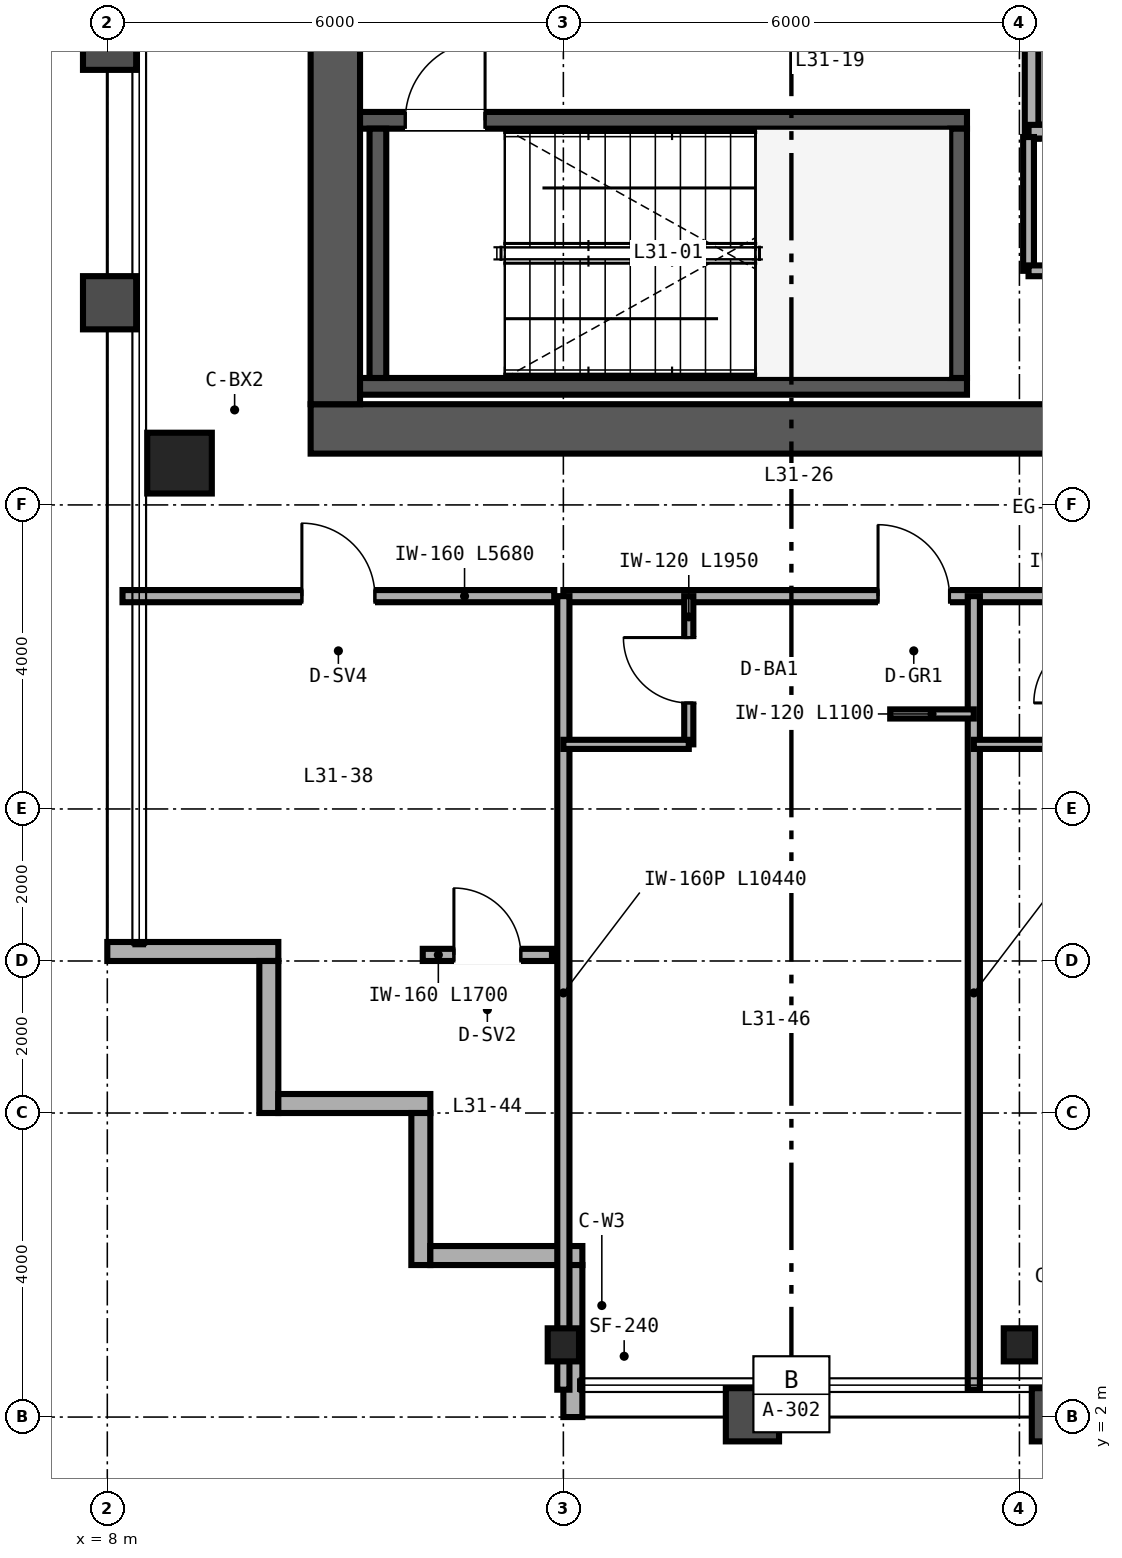
"""IFC4 building model, lengths in metres.
Left out: names, types, materials, properties, quantities, classifications, styles, units other than length and angle.
Written with IfcOpenShell. Run it as: python <this file> out.ifc"""

import sys

from ifc_helpers import new_model, si_unit, direction, frame, frame_2d, origin, origin_2d, place, context, subcontext, project, spatial, rectangle, hollow_rectangle, i_section, extrude, source, transform, mapped, element, fill, save


model = new_model("IFC4")
c1 = context("Model", 3, precision=1e-05, world=origin(), true_north=direction((0.0, 1.0)))
c2 = subcontext(c1, "Body", "Model", "MODEL_VIEW")
j1 = project(units=[si_unit("LENGTHUNIT", "METRE"), si_unit("PLANEANGLEUNIT", "RADIAN")], contexts=[c1])
p1 = place(None, origin())
s1 = spatial("IfcSite", under=j1, at=p1, CompositionType="ELEMENT")
p2 = place(p1, origin())
s2 = spatial("IfcBuilding", under=s1, at=p2, CompositionType="ELEMENT")
p3 = place(p2, frame((0.0, 0.0, 126.0)))
s3 = spatial("IfcBuildingStorey", under=s2, at=p3, CompositionType="ELEMENT", Elevation=126.0)
p4 = place(p3, frame((10.675, 15.0, 0.0), z_axis=(0.0, 0.0, 1.0), x_axis=(1.0, 0.0, 0.0)))
e1 = element("IfcWall", 1, at=p4, inside=s3, PredefinedType="SHEAR", context=c2, shape_type="SweptSolid", body=[
    extrude(rectangle(XDim=12.65, YDim=0.65, at=frame_2d((6.325, 0.0))), origin(), (0.0, 0.0, 1.0), 3.36),
])
p5 = place(p4, frame((10.225, 0.0, 0.0)))
e2 = element("IfcOpeningElement", 2, at=p5, cuts=e1, PredefinedType="OPENING", context=c2, shape_type="SweptSolid", body=[
    extrude(rectangle(XDim=1.0, YDim=2.15, at=frame_2d((0.5, 1.075))), frame((0.0, 0.335, 0.0), z_axis=(0.0, -1.0, 0.0), x_axis=(1.0, 0.0, 0.0)), (0.0, 0.0, 1.0), 0.67),
])
p6 = place(p3, frame((11.0, 15.325, 0.0), z_axis=(0.0, 0.0, 1.0), x_axis=(0.0, 1.0, 0.0)))
e3 = element("IfcWall", 3, at=p6, inside=s3, PredefinedType="SHEAR", context=c2, shape_type="SweptSolid", body=[
    extrude(rectangle(XDim=21.35, YDim=0.65, at=frame_2d((10.675, 0.0))), origin(), (0.0, 0.0, 1.0), 3.36),
])
p7 = place(p3, frame((11.325, 15.56, 0.0), z_axis=(0.0, 0.0, 1.0), x_axis=(1.0, 0.0, 0.0)))
e4 = element("IfcWall", 4, at=p7, inside=s3, PredefinedType="SHEAR", context=c2, shape_type="SweptSolid", body=[
    extrude(rectangle(XDim=7.985, YDim=0.22, at=frame_2d((3.993, 0.0))), origin(), (0.0, 0.0, 1.0), 3.4),
])
p8 = place(p3, frame((11.325, 19.06, 0.0), z_axis=(0.0, 0.0, 1.0), x_axis=(1.0, 0.0, 0.0)))
e5 = element("IfcWall", 5, at=p8, inside=s3, PredefinedType="SHEAR", context=c2, shape_type="SweptSolid", body=[
    extrude(rectangle(XDim=7.985, YDim=0.22, at=frame_2d((3.993, 0.0))), origin(), (0.0, 0.0, 1.0), 3.4),
])
p9 = place(p8, frame((0.595, 0.0, 0.0)))
e6 = element("IfcOpeningElement", 6, at=p9, cuts=e5, PredefinedType="OPENING", context=c2, shape_type="SweptSolid", body=[
    extrude(rectangle(XDim=1.05, YDim=2.15, at=frame_2d((0.525, 1.075))), frame((0.0, 0.12, 0.0), z_axis=(0.0, -1.0, 0.0), x_axis=(1.0, 0.0, 0.0)), (0.0, 0.0, 1.0), 0.24),
])
for number, where, z_axis, x_axis in (
    (7, (11.56, 15.67, 0.0), (0.0, 0.0, 1.0), (0.0, 1.0, 0.0)),
    (8, (19.2, 15.67, 0.0), (0.0, 0.0, 1.0), (0.0, 1.0, 0.0)),
):
    element("IfcWall", number, at=place(p3, frame(where, z_axis=z_axis, x_axis=x_axis)), inside=s3, PredefinedType="SHEAR", context=c2, shape_type="SweptSolid", body=[
        extrude(rectangle(XDim=3.28, YDim=0.22, at=frame_2d((1.64, 0.0))), origin(), (0.0, 0.0, 1.0), 3.4),
    ])
m1 = source(origin(), c2, "Body", "SweptSolid", [
    extrude(hollow_rectangle(XDim=0.85, YDim=0.8, WallThickness=0.032, at=origin_2d()), origin(), (0.0, 0.0, 1.0), 3.36),
])
p10 = place(p3, frame((8.95, 14.55, 0.0), z_axis=(0.0, 0.0, 1.0), x_axis=(1.0, 0.0, 0.0)))
e9 = element("IfcColumn", 9, at=p10, inside=s3, PredefinedType="COLUMN", context=c2, shape_type="MappedRepresentation", body=[
    mapped(m1, transform((0.0, 0.0, 0.0), scale=1.0)),
])
m2 = source(origin(), c2, "Body", "SweptSolid", [
    extrude(i_section(OverallWidth=0.412, OverallDepth=0.435, WebThickness=0.036, FlangeThickness=0.057, FilletRadius=0.025, at=origin_2d()), origin(), (0.0, 0.0, 1.0), 3.36),
])
for number, where, z_axis, x_axis in (
    (10, (14.0, 2.95, 0.0), (0.0, 0.0, 1.0), (1.0, 0.0, 0.0)),
    (11, (20.0, 2.95, 0.0), (0.0, 0.0, 1.0), (1.0, 0.0, 0.0)),
):
    element("IfcColumn", number, at=place(p3, frame(where, z_axis=z_axis, x_axis=x_axis)), inside=s3, PredefinedType="COLUMN", context=c2, shape_type="MappedRepresentation", body=[
        mapped(m2, transform((0.0, 0.0, 0.0), scale=1.0)),
    ])
p11 = place(p3, frame((8.0, 8.125, 0.0), z_axis=(0.0, 0.0, 1.0), x_axis=(1.0, 0.0, 0.0)))
e12 = element("IfcWall", 12, at=p11, inside=s3, PredefinedType="SOLIDWALL", context=c2, shape_type="SweptSolid", body=[
    extrude(rectangle(XDim=2.25, YDim=0.25, at=frame_2d((1.125, 0.0))), origin(), (0.0, 0.0, 1.0), 3.36),
])
for number, where, z_axis, x_axis in (
    (13, (10.125, 8.0, 0.0), (0.0, 0.0, 1.0), (0.0, -1.0, 0.0)),
    (14, (10.25, 6.125, 0.0), (0.0, 0.0, 1.0), (1.0, 0.0, 0.0)),
    (15, (12.125, 6.0, 0.0), (0.0, 0.0, 1.0), (0.0, -1.0, 0.0)),
    (16, (12.25, 4.125, 0.0), (0.0, 0.0, 1.0), (1.0, 0.0, 0.0)),
):
    element("IfcWall", number, at=place(p3, frame(where, z_axis=z_axis, x_axis=x_axis)), inside=s3, PredefinedType="SOLIDWALL", context=c2, shape_type="SweptSolid", body=[
        extrude(rectangle(XDim=2.0, YDim=0.25, at=frame_2d((1.0, 0.0))), origin(), (0.0, 0.0, 1.0), 3.36),
    ])
p12 = place(p3, frame((14.125, 4.0, 0.0), z_axis=(0.0, 0.0, 1.0), x_axis=(0.0, -1.0, 0.0)))
e17 = element("IfcWall", 17, at=p12, inside=s3, PredefinedType="SOLIDWALL", context=c2, shape_type="SweptSolid", body=[
    extrude(rectangle(XDim=2.0, YDim=0.25, at=frame_2d((1.0, 0.0))), origin(), (0.0, 0.0, 1.0), 2.667),
])
p13 = place(p3, frame((20.16, 18.82, 0.0), z_axis=(0.0, 0.0, 1.0), x_axis=(0.0, 1.0, 0.0)))
e18 = element("IfcWall", 18, at=p13, inside=s3, PredefinedType="SOLIDWALL", context=c2, shape_type="SweptSolid", body=[
    extrude(rectangle(XDim=6.32, YDim=0.18, at=frame_2d((3.16, 0.0))), origin(), (0.0, 0.0, 1.0), 2.36),
])
p14 = place(p3, frame((20.12, 18.91, 0.0), z_axis=(0.0, 0.0, 1.0), x_axis=(1.0, 0.0, 0.0)))
e19 = element("IfcWall", 19, at=p14, inside=s3, PredefinedType="SOLIDWALL", context=c2, shape_type="SweptSolid", body=[
    extrude(rectangle(XDim=2.63, YDim=0.18, at=frame_2d((1.315, 0.0))), origin(), (0.0, 0.0, 1.0), 3.36),
])
p15 = place(p3, frame((20.12, 17.08, 0.0), z_axis=(0.0, 0.0, 1.0), x_axis=(0.0, 1.0, 0.0)))
e20 = element("IfcWall", 20, at=p15, inside=s3, PredefinedType="PARTITIONING", context=c2, shape_type="SweptSolid", body=[
    extrude(rectangle(XDim=1.76, YDim=0.142, at=frame_2d((0.88, 0.0))), origin(), (0.0, 0.0, 1.0), 3.36),
])
p16 = place(p3, frame((20.12, 17.08, 0.0), z_axis=(0.0, 0.0, 1.0), x_axis=(1.0, 0.0, 0.0)))
e21 = element("IfcWall", 21, at=p16, inside=s3, PredefinedType="PARTITIONING", context=c2, shape_type="SweptSolid", body=[
    extrude(rectangle(XDim=2.63, YDim=0.142, at=frame_2d((1.315, 0.0))), origin(), (0.0, 0.0, 1.0), 3.36),
])
p17 = place(p16, frame((0.85, 0.0, 0.0)))
e22 = element("IfcOpeningElement", 22, at=p17, cuts=e21, PredefinedType="OPENING", context=c2, shape_type="SweptSolid", body=[
    extrude(rectangle(XDim=0.84, YDim=2.1, at=frame_2d((0.42, 1.05))), frame((0.0, 0.081, 0.0), z_axis=(0.0, -1.0, 0.0), x_axis=(1.0, 0.0, 0.0)), (0.0, 0.0, 1.0), 0.162),
])
p18 = place(p3, frame((8.2, 12.8, 0.0), z_axis=(0.0, 0.0, 1.0), x_axis=(1.0, 0.0, 0.0)))
e23 = element("IfcWall", 23, at=p18, inside=s3, PredefinedType="PARTITIONING", context=c2, shape_type="SweptSolid", body=[
    extrude(rectangle(XDim=5.68, YDim=0.16, at=frame_2d((2.84, 0.0))), origin(), (0.0, 0.0, 1.0), 3.36),
])
p19 = place(p18, frame((2.36, 0.0, 0.0)))
e24 = element("IfcOpeningElement", 24, at=p19, cuts=e23, PredefinedType="OPENING", context=c2, shape_type="SweptSolid", body=[
    extrude(rectangle(XDim=0.96, YDim=2.15, at=frame_2d((0.48, 1.075))), frame((0.0, 0.09, 0.0), z_axis=(0.0, -1.0, 0.0), x_axis=(1.0, 0.0, 0.0)), (0.0, 0.0, 1.0), 0.18),
])
p20 = place(p3, frame((12.15, 8.08, 0.0), z_axis=(0.0, 0.0, 1.0), x_axis=(1.0, 0.0, 0.0)))
e25 = element("IfcWall", 25, at=p20, inside=s3, PredefinedType="PARTITIONING", context=c2, shape_type="SweptSolid", body=[
    extrude(rectangle(XDim=1.7, YDim=0.16, at=frame_2d((0.85, 0.0))), origin(), (0.0, 0.0, 1.0), 3.36),
])
p21 = place(p20, frame((0.41, 0.0, 0.0)))
e26 = element("IfcOpeningElement", 26, at=p21, cuts=e25, PredefinedType="OPENING", context=c2, shape_type="SweptSolid", body=[
    extrude(rectangle(XDim=0.88, YDim=2.15, at=frame_2d((0.44, 1.075))), frame((0.0, 0.09, 0.0), z_axis=(0.0, -1.0, 0.0), x_axis=(1.0, 0.0, 0.0)), (0.0, 0.0, 1.0), 0.18),
])
p22 = place(p3, frame((14.0, 12.8, 0.0), z_axis=(0.0, 0.0, 1.0), x_axis=(1.0, 0.0, 0.0)))
e27 = element("IfcWall", 27, at=p22, inside=s3, PredefinedType="PARTITIONING", context=c2, shape_type="SweptSolid", body=[
    extrude(rectangle(XDim=36.0, YDim=0.16, at=frame_2d((18.0, 0.0))), origin(), (0.0, 0.0, 1.0), 2.581),
])
p23 = place(p22, frame((4.14, 0.0, 0.0)))
e28 = element("IfcOpeningElement", 28, at=p23, cuts=e27, PredefinedType="OPENING", context=c2, shape_type="SweptSolid", body=[
    extrude(rectangle(XDim=0.94, YDim=2.15, at=frame_2d((0.47, 1.075))), frame((0.0, 0.09, 0.0), z_axis=(0.0, -1.0, 0.0), x_axis=(1.0, 0.0, 0.0)), (0.0, 0.0, 1.0), 0.18),
])
p24 = place(p22, frame((9.54, 0.0, 0.0)))
e29 = element("IfcOpeningElement", 29, at=p24, cuts=e27, PredefinedType="OPENING", context=c2, shape_type="SweptSolid", body=[
    extrude(rectangle(XDim=0.94, YDim=2.15, at=frame_2d((0.47, 1.075))), frame((0.0, 0.09, 0.0), z_axis=(0.0, -1.0, 0.0), x_axis=(1.0, 0.0, 0.0)), (0.0, 0.0, 1.0), 0.18),
])
p25 = place(p22, frame((13.22, 0.0, 0.0)))
e30 = element("IfcOpeningElement", 30, at=p25, cuts=e27, PredefinedType="OPENING", context=c2, shape_type="SweptSolid", body=[
    extrude(rectangle(XDim=0.96, YDim=2.15, at=frame_2d((0.48, 1.075))), frame((0.0, 0.09, 0.0), z_axis=(0.0, -1.0, 0.0), x_axis=(1.0, 0.0, 0.0)), (0.0, 0.0, 1.0), 0.18),
])
p26 = place(p22, frame((19.02, 0.0, 0.0)))
e31 = element("IfcOpeningElement", 31, at=p26, cuts=e27, PredefinedType="OPENING", context=c2, shape_type="SweptSolid", body=[
    extrude(rectangle(XDim=0.96, YDim=2.15, at=frame_2d((0.48, 1.075))), frame((0.0, 0.09, 0.0), z_axis=(0.0, -1.0, 0.0), x_axis=(1.0, 0.0, 0.0)), (0.0, 0.0, 1.0), 0.18),
])
p27 = place(p22, frame((24.62, 0.0, 0.0)))
e32 = element("IfcOpeningElement", 32, at=p27, cuts=e27, PredefinedType="OPENING", context=c2, shape_type="SweptSolid", body=[
    extrude(rectangle(XDim=0.96, YDim=2.15, at=frame_2d((0.48, 1.075))), frame((0.0, 0.09, 0.0), z_axis=(0.0, -1.0, 0.0), x_axis=(1.0, 0.0, 0.0)), (0.0, 0.0, 1.0), 0.18),
])
p28 = place(p22, frame((30.74, 0.0, 0.0)))
e33 = element("IfcOpeningElement", 33, at=p28, cuts=e27, PredefinedType="OPENING", context=c2, shape_type="SweptSolid", body=[
    extrude(rectangle(XDim=0.94, YDim=2.15, at=frame_2d((0.47, 1.075))), frame((0.0, 0.09, 0.0), z_axis=(0.0, -1.0, 0.0), x_axis=(1.0, 0.0, 0.0)), (0.0, 0.0, 1.0), 0.18),
])
p29 = place(p22, frame((33.52, 0.0, 0.0)))
e34 = element("IfcOpeningElement", 34, at=p29, cuts=e27, PredefinedType="OPENING", context=c2, shape_type="SweptSolid", body=[
    extrude(rectangle(XDim=0.96, YDim=2.15, at=frame_2d((0.48, 1.075))), frame((0.0, 0.09, 0.0), z_axis=(0.0, -1.0, 0.0), x_axis=(1.0, 0.0, 0.0)), (0.0, 0.0, 1.0), 0.18),
])
for number, where, z_axis, x_axis in (
    (35, (14.0, 2.36, 0.0), (0.0, 0.0, 1.0), (0.0, 1.0, 0.0)),
    (36, (19.4, 2.36, 0.0), (0.0, 0.0, 1.0), (0.0, 1.0, 0.0)),
):
    element("IfcWall", number, at=place(p3, frame(where, z_axis=z_axis, x_axis=x_axis)), inside=s3, PredefinedType="PARTITIONING", context=c2, shape_type="SweptSolid", body=[
        extrude(rectangle(XDim=10.44, YDim=0.16, at=frame_2d((5.22, 0.0))), origin(), (0.0, 0.0, 1.0), 2.667),
    ])
p30 = place(p3, frame((15.65, 10.85, 0.0), z_axis=(0.0, 0.0, 1.0), x_axis=(0.0, 1.0, 0.0)))
e37 = element("IfcWall", 37, at=p30, inside=s3, PredefinedType="PARTITIONING", context=c2, shape_type="SweptSolid", body=[
    extrude(rectangle(XDim=1.95, YDim=0.12, at=frame_2d((0.975, 0.0))), origin(), (0.0, 0.0, 1.0), 3.36),
])
p31 = place(p30, frame((0.545, 0.0, 0.0)))
e38 = element("IfcOpeningElement", 38, at=p31, cuts=e37, PredefinedType="OPENING", context=c2, shape_type="SweptSolid", body=[
    extrude(rectangle(XDim=0.86, YDim=2.1, at=frame_2d((0.43, 1.05))), frame((0.0, 0.07, 0.0), z_axis=(0.0, -1.0, 0.0), x_axis=(1.0, 0.0, 0.0)), (0.0, 0.0, 1.0), 0.14),
])
p32 = place(p3, frame((14.0, 10.85, 0.0), z_axis=(0.0, 0.0, 1.0), x_axis=(1.0, 0.0, 0.0)))
e39 = element("IfcWall", 39, at=p32, inside=s3, PredefinedType="PARTITIONING", context=c2, shape_type="SweptSolid", body=[
    extrude(rectangle(XDim=1.65, YDim=0.12, at=frame_2d((0.825, 0.0))), origin(), (0.0, 0.0, 1.0), 3.36),
])
p33 = place(p3, frame((18.3, 11.25, 0.0), z_axis=(0.0, 0.0, 1.0), x_axis=(1.0, 0.0, 0.0)))
e40 = element("IfcWall", 40, at=p33, inside=s3, PredefinedType="PARTITIONING", context=c2, shape_type="SweptSolid", body=[
    extrude(rectangle(XDim=1.1, YDim=0.12, at=frame_2d((0.55, 0.0))), origin(), (0.0, 0.0, 1.0), 3.36),
])
p34 = place(p3, frame((19.4, 10.85, 0.0), z_axis=(0.0, 0.0, 1.0), x_axis=(1.0, 0.0, 0.0)))
e41 = element("IfcWall", 41, at=p34, inside=s3, PredefinedType="PARTITIONING", context=c2, shape_type="SweptSolid", body=[
    extrude(rectangle(XDim=1.65, YDim=0.12, at=frame_2d((0.825, 0.0))), origin(), (0.0, 0.0, 1.0), 3.36),
])
m3 = source(origin(), c2, "Body", "SweptSolid", [
    extrude(rectangle(XDim=1.05, YDim=2.15, at=frame_2d((0.525, 1.075))), frame((0.0, 0.025, 0.0), z_axis=(0.0, -1.0, 0.0), x_axis=(1.0, 0.0, 0.0)), (0.0, 0.0, 1.0), 0.05),
])
p35 = place(p9, origin())
e42 = element("IfcDoor", 42, at=p35, inside=s3, OperationType="SINGLE_SWING_RIGHT", PredefinedType="DOOR", context=c2, shape_type="MappedRepresentation", body=[
    mapped(m3, transform((0.0, 0.0, 0.0), scale=1.0)),
])
fill(e6, e42)
m4 = source(origin(), c2, "Body", "SweptSolid", [
    extrude(rectangle(XDim=0.96, YDim=2.15, at=frame_2d((0.48, 1.075))), frame((0.0, 0.025, 0.0), z_axis=(0.0, -1.0, 0.0), x_axis=(1.0, 0.0, 0.0)), (0.0, 0.0, 1.0), 0.05),
])
p36 = place(p19, origin())
e43 = element("IfcDoor", 43, at=p36, inside=s3, OperationType="SINGLE_SWING_LEFT", PredefinedType="DOOR", context=c2, shape_type="MappedRepresentation", body=[
    mapped(m4, transform((0.0, 0.0, 0.0), scale=1.0)),
])
fill(e24, e43)
m5 = source(origin(), c2, "Body", "SweptSolid", [
    extrude(rectangle(XDim=0.88, YDim=2.15, at=frame_2d((0.44, 1.075))), frame((0.0, 0.025, 0.0), z_axis=(0.0, -1.0, 0.0), x_axis=(1.0, 0.0, 0.0)), (0.0, 0.0, 1.0), 0.05),
])
p37 = place(p21, origin())
e44 = element("IfcDoor", 44, at=p37, inside=s3, OperationType="SINGLE_SWING_LEFT", PredefinedType="DOOR", context=c2, shape_type="MappedRepresentation", body=[
    mapped(m5, transform((0.0, 0.0, 0.0), scale=1.0)),
])
fill(e26, e44)
m6 = source(origin(), c2, "Body", "SweptSolid", [
    extrude(rectangle(XDim=0.86, YDim=2.1, at=frame_2d((0.43, 1.05))), frame((0.0, 0.025, 0.0), z_axis=(0.0, -1.0, 0.0), x_axis=(1.0, 0.0, 0.0)), (0.0, 0.0, 1.0), 0.05),
])
p38 = place(p31, origin())
e45 = element("IfcDoor", 45, at=p38, inside=s3, OperationType="SINGLE_SWING_RIGHT", PredefinedType="DOOR", context=c2, shape_type="MappedRepresentation", body=[
    mapped(m6, transform((0.0, 0.0, 0.0), scale=1.0)),
])
fill(e38, e45)
m7 = source(origin(), c2, "Body", "SweptSolid", [
    extrude(rectangle(XDim=0.94, YDim=2.15, at=frame_2d((0.47, 1.075))), frame((0.0, 0.025, 0.0), z_axis=(0.0, -1.0, 0.0), x_axis=(1.0, 0.0, 0.0)), (0.0, 0.0, 1.0), 0.05),
])
p39 = place(p23, origin())
e46 = element("IfcDoor", 46, at=p39, inside=s3, OperationType="SINGLE_SWING_LEFT", PredefinedType="DOOR", context=c2, shape_type="MappedRepresentation", body=[
    mapped(m7, transform((0.0, 0.0, 0.0), scale=1.0)),
])
fill(e28, e46)
save(model, sys.argv[1])
